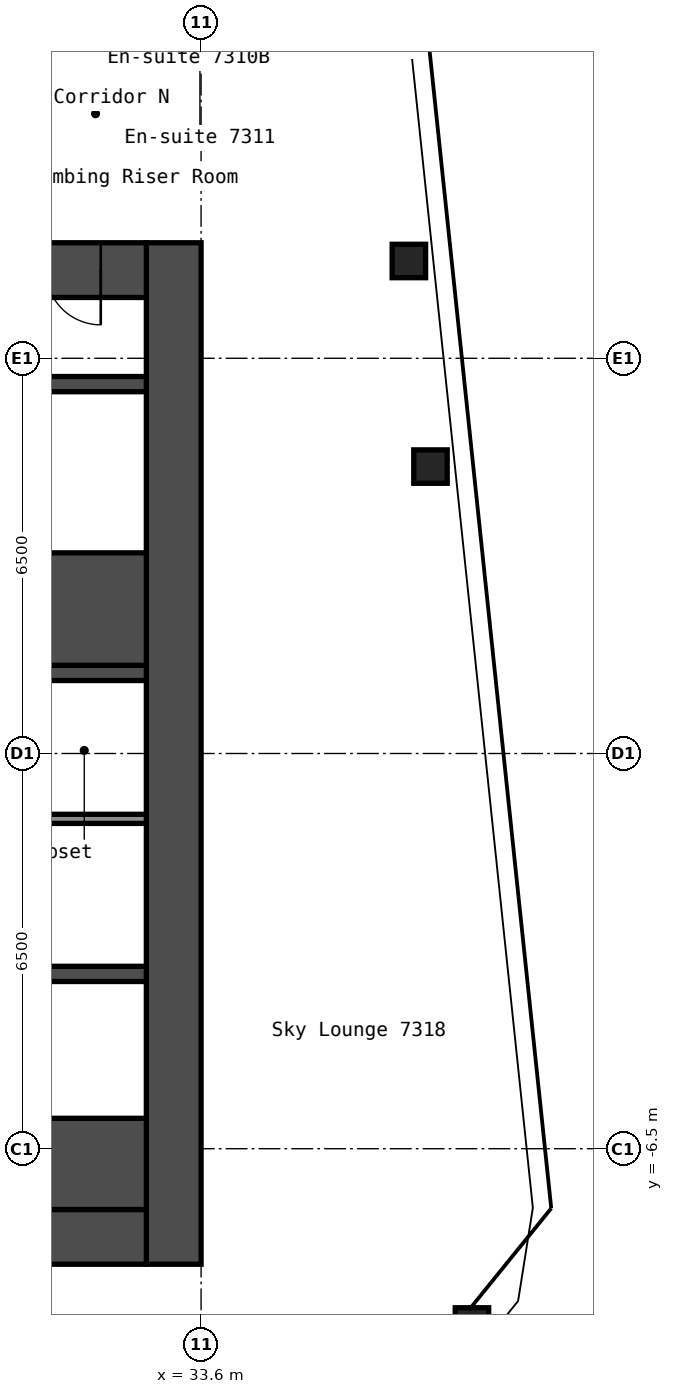
"""IFC4 building model, lengths in metres.
Left out: names, types, materials, properties, quantities, classifications, styles, units other than length and angle.
Written with IfcOpenShell. Run it as: python <this file> out.ifc"""

import sys

from ifc_helpers import new_model, si_unit, direction, frame, frame_2d, origin, origin_2d, place, context, subcontext, project, spatial, rectangle, hollow_rectangle, extrude, element, fill, save


model = new_model("IFC4")
c1 = context("Model", 3, precision=1e-05, world=origin(), true_north=direction((0.0, 1.0)))
c2 = subcontext(c1, "Body", "Model", "MODEL_VIEW")
j1 = project(units=[si_unit("LENGTHUNIT", "METRE"), si_unit("PLANEANGLEUNIT", "RADIAN")], contexts=[c1])
p1 = place(None, origin())
s1 = spatial("IfcSite", under=j1, at=p1, CompositionType="ELEMENT")
p2 = place(p1, origin())
s2 = spatial("IfcBuilding", under=s1, at=p2, CompositionType="ELEMENT")
p3 = place(p2, frame((0.0, 0.0, 258.2)))
s3 = spatial("IfcBuildingStorey", under=s2, at=p3, CompositionType="ELEMENT", Elevation=258.2)
for number, where, z_axis, x_axis in (
    (1, (38.054, -9.39, 0.0), (0.0, 0.0, 1.0), (1.0, 0.0, 0.0)),
    (2, (37.373, 4.719, 0.0), (0.0, 0.0, 1.0), (1.0, 0.0, 0.0)),
    (3, (37.017, 8.1, 0.0), (0.0, 0.0, 1.0), (1.0, 0.0, 0.0)),
):
    element("IfcColumn", number, at=place(p3, frame(where, z_axis=z_axis, x_axis=x_axis)), inside=s3, PredefinedType="COLUMN", context=c2, shape_type="SweptSolid", body=[
        extrude(hollow_rectangle(XDim=0.55, YDim=0.55, WallThickness=0.022, InnerFilletRadius=0.033, OuterFilletRadius=0.055, at=origin_2d()), origin(), (0.0, 0.0, 1.0), 2.75),
    ])
p4 = place(p3, frame((33.15, -8.4, 0.0), z_axis=(0.0, 0.0, 1.0), x_axis=(0.0, 1.0, 0.0)))
e4 = element("IfcWall", 4, at=p4, inside=s3, PredefinedType="SHEAR", context=c2, shape_type="SweptSolid", body=[
    extrude(rectangle(XDim=16.8, YDim=0.9, at=frame_2d((8.4, 0.0))), origin(), (0.0, 0.0, 1.0), 2.75),
])
p5 = place(p3, frame((17.7, 7.95, 0.0), z_axis=(0.0, 0.0, 1.0), x_axis=(1.0, 0.0, 0.0)))
e5 = element("IfcWall", 5, at=p5, inside=s3, PredefinedType="SHEAR", context=c2, shape_type="SweptSolid", body=[
    extrude(rectangle(XDim=15.0, YDim=0.9, at=frame_2d((7.5, 0.0))), origin(), (0.0, 0.0, 1.0), 2.75),
])
p6 = place(p5, frame((10.4, 0.0, 0.0)))
e6 = element("IfcOpeningElement", 6, at=p6, cuts=e5, PredefinedType="OPENING", context=c2, shape_type="SweptSolid", body=[
    extrude(rectangle(XDim=1.2, YDim=2.1, at=frame_2d((0.6, 1.05))), frame((0.0, 0.46, 0.0), z_axis=(0.0, -1.0, 0.0), x_axis=(1.0, 0.0, 0.0)), (0.0, 0.0, 1.0), 0.92),
])
p7 = place(p5, frame((13.35, 0.0, 0.0)))
e7 = element("IfcOpeningElement", 7, at=p7, cuts=e5, PredefinedType="OPENING", context=c2, shape_type="SweptSolid", body=[
    extrude(rectangle(XDim=0.9, YDim=2.1, at=frame_2d((0.45, 1.05))), frame((0.0, 0.46, 0.0), z_axis=(0.0, -1.0, 0.0), x_axis=(1.0, 0.0, 0.0)), (0.0, 0.0, 1.0), 0.92),
])
p8 = place(p3, frame((17.7, -7.95, 0.0), z_axis=(0.0, 0.0, 1.0), x_axis=(1.0, 0.0, 0.0)))
e8 = element("IfcWall", 8, at=p8, inside=s3, PredefinedType="SHEAR", context=c2, shape_type="SweptSolid", body=[
    extrude(rectangle(XDim=15.0, YDim=0.9, at=frame_2d((7.5, 0.0))), origin(), (0.0, 0.0, 1.0), 2.75),
])
p9 = place(p8, frame((2.55, 0.0, 0.0)))
e9 = element("IfcOpeningElement", 9, at=p9, cuts=e8, PredefinedType="OPENING", context=c2, shape_type="SweptSolid", body=[
    extrude(rectangle(XDim=1.0, YDim=2.1, at=frame_2d((0.5, 1.05))), frame((0.0, 0.46, 0.0), z_axis=(0.0, -1.0, 0.0), x_axis=(1.0, 0.0, 0.0)), (0.0, 0.0, 1.0), 0.92),
])
p10 = place(p3, frame((27.65, 1.325, 0.0), z_axis=(0.0, 0.0, 1.0), x_axis=(1.0, 0.0, 0.0)))
e10 = element("IfcWall", 10, at=p10, inside=s3, PredefinedType="SHEAR", context=c2, shape_type="SweptSolid", body=[
    extrude(rectangle(XDim=5.05, YDim=0.25, at=frame_2d((2.525, 0.0))), origin(), (0.0, 0.0, 1.0), 2.75),
])
p11 = place(p10, frame((0.55, 0.0, 0.0)))
e11 = element("IfcOpeningElement", 11, at=p11, cuts=e10, PredefinedType="OPENING", context=c2, shape_type="SweptSolid", body=[
    extrude(rectangle(XDim=1.2, YDim=2.1, at=frame_2d((0.6, 1.05))), frame((0.0, 0.135, 0.0), z_axis=(0.0, -1.0, 0.0), x_axis=(1.0, 0.0, 0.0)), (0.0, 0.0, 1.0), 0.27),
])
p12 = place(p3, frame((30.3, 2.375, 0.0), z_axis=(0.0, 0.0, 1.0), x_axis=(1.0, 0.0, 0.0)))
e12 = element("IfcWall", 12, at=p12, inside=s3, PredefinedType="SHEAR", context=c2, shape_type="SweptSolid", body=[
    extrude(rectangle(XDim=2.4, YDim=1.85, at=frame_2d((1.2, 0.0))), origin(), (0.0, 0.0, 1.0), 2.75),
])
p13 = place(p3, frame((30.3, 6.075, 0.0), z_axis=(0.0, 0.0, 1.0), x_axis=(1.0, 0.0, 0.0)))
e13 = element("IfcWall", 13, at=p13, inside=s3, PredefinedType="SHEAR", context=c2, shape_type="SweptSolid", body=[
    extrude(rectangle(XDim=2.4, YDim=0.25, at=frame_2d((1.2, 0.0))), origin(), (0.0, 0.0, 1.0), 2.75),
])
p14 = place(p3, frame((28.15, -3.625, 0.0), z_axis=(0.0, 0.0, 1.0), x_axis=(1.0, 0.0, 0.0)))
e14 = element("IfcWall", 14, at=p14, inside=s3, PredefinedType="SHEAR", context=c2, shape_type="SweptSolid", body=[
    extrude(rectangle(XDim=4.55, YDim=0.25, at=frame_2d((2.275, 0.0))), origin(), (0.0, 0.0, 1.0), 2.75),
])
p15 = place(p3, frame((28.15, -6.75, 0.0), z_axis=(0.0, 0.0, 1.0), x_axis=(1.0, 0.0, 0.0)))
e15 = element("IfcWall", 15, at=p15, inside=s3, PredefinedType="SHEAR", context=c2, shape_type="SweptSolid", body=[
    extrude(rectangle(XDim=4.55, YDim=1.5, at=frame_2d((2.275, 0.0))), origin(), (0.0, 0.0, 1.0), 2.75),
])
p16 = place(p3, frame((29.7, -1.075, 0.0), z_axis=(0.0, 0.0, 1.0), x_axis=(1.0, 0.0, 0.0)))
e16 = element("IfcWall", 16, at=p16, inside=s3, PredefinedType="PARTITIONING", context=c2, shape_type="SweptSolid", body=[
    extrude(rectangle(XDim=3.0, YDim=0.15, at=frame_2d((1.5, 0.0))), origin(), (0.0, 0.0, 1.0), 2.75),
])
p17 = place(p3, frame((16.048, 10.533, 0.0), z_axis=(0.0, 0.0, 1.0), x_axis=(0.994522460242, 0.104523088709, 0.0)))
e17 = element("IfcWall", 17, at=p17, inside=s3, PredefinedType="PARTITIONING", context=c2, shape_type="SweptSolid", body=[
    extrude(rectangle(XDim=21.3, YDim=0.2, at=frame_2d((10.65, 0.0))), origin(), (0.0, 0.0, 1.0), 2.75),
])
p18 = place(p17, frame((2.0, 0.0, 0.0)))
e18 = element("IfcOpeningElement", 18, at=p18, cuts=e17, PredefinedType="OPENING", context=c2, shape_type="SweptSolid", body=[
    extrude(rectangle(XDim=1.0, YDim=2.1, at=frame_2d((0.5, 1.05))), frame((0.0, 0.11, 0.0), z_axis=(0.0, -1.0, 0.0), x_axis=(1.0, 0.0, 0.0)), (0.0, 0.0, 1.0), 0.22),
])
p19 = place(p17, frame((11.25, 0.0, 0.0)))
e19 = element("IfcOpeningElement", 19, at=p19, cuts=e17, PredefinedType="OPENING", context=c2, shape_type="SweptSolid", body=[
    extrude(rectangle(XDim=1.0, YDim=2.1, at=frame_2d((0.5, 1.05))), frame((0.0, 0.11, 0.0), z_axis=(0.0, -1.0, 0.0), x_axis=(1.0, 0.0, 0.0)), (0.0, 0.0, 1.0), 0.22),
])
p20 = place(p17, frame((12.95, 0.0, 0.0)))
e20 = element("IfcOpeningElement", 20, at=p20, cuts=e17, PredefinedType="OPENING", context=c2, shape_type="SweptSolid", body=[
    extrude(rectangle(XDim=1.0, YDim=2.1, at=frame_2d((0.5, 1.05))), frame((0.0, 0.11, 0.0), z_axis=(0.0, -1.0, 0.0), x_axis=(1.0, 0.0, 0.0)), (0.0, 0.0, 1.0), 0.22),
])
p21 = place(p17, frame((19.65, 0.0, 0.0)))
e21 = element("IfcOpeningElement", 21, at=p21, cuts=e17, PredefinedType="OPENING", context=c2, shape_type="SweptSolid", body=[
    extrude(rectangle(XDim=1.0, YDim=2.1, at=frame_2d((0.5, 1.05))), frame((0.0, 0.11, 0.0), z_axis=(0.0, -1.0, 0.0), x_axis=(1.0, 0.0, 0.0)), (0.0, 0.0, 1.0), 0.22),
])
p22 = place(p7, origin())
e22 = element("IfcDoor", 22, at=p22, inside=s3, OperationType="SINGLE_SWING_RIGHT", PredefinedType="DOOR", context=c2, shape_type="SweptSolid", body=[
    extrude(rectangle(XDim=0.9, YDim=2.1, at=frame_2d((0.45, 1.05))), frame((0.0, 0.025, 0.0), z_axis=(0.0, -1.0, 0.0), x_axis=(1.0, 0.0, 0.0)), (0.0, 0.0, 1.0), 0.05),
])
fill(e7, e22)
save(model, sys.argv[1])
